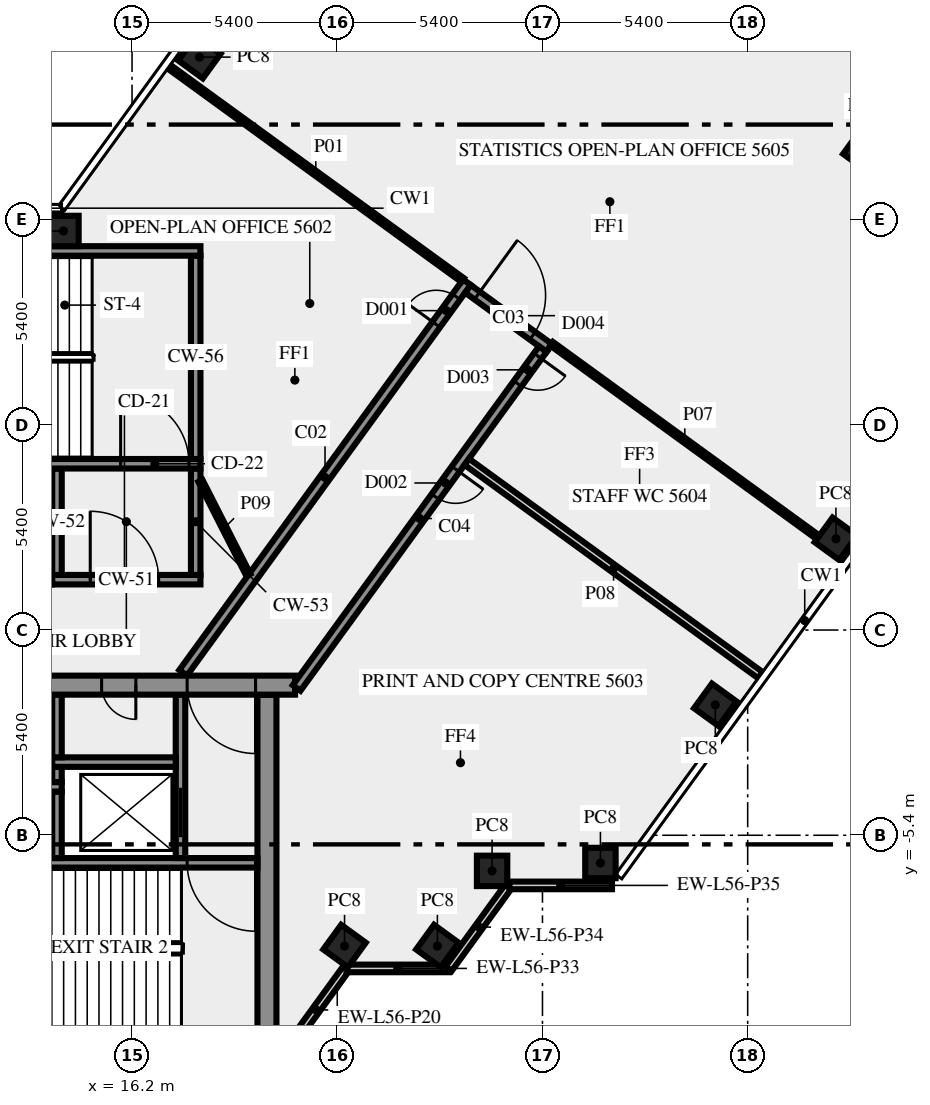
"""IFC4 building model, lengths in metres.
Left out: names, types, materials, properties, quantities, classifications, styles, units other than length and angle.
Written with IfcOpenShell. Run it as: python <this file> out.ifc"""

import sys

from ifc_helpers import new_model, si_unit, direction, frame, frame_2d, origin, origin_2d, place, context, subcontext, project, spatial, rectangle, extrude, element, fill, save


model = new_model("IFC4")
c1 = context("Model", 3, precision=1e-05, world=origin(), true_north=direction((0.0, 1.0)))
c2 = subcontext(c1, "Body", "Model", "MODEL_VIEW")
j1 = project(units=[si_unit("LENGTHUNIT", "METRE"), si_unit("PLANEANGLEUNIT", "RADIAN")], contexts=[c1])
p1 = place(None, origin())
s1 = spatial("IfcSite", under=j1, at=p1, CompositionType="ELEMENT")
p2 = place(p1, origin())
s2 = spatial("IfcBuilding", under=s1, at=p2, CompositionType="ELEMENT")
p3 = place(p2, frame((0.0, 0.0, 238.0)))
s3 = spatial("IfcBuildingStorey", under=s2, at=p3, CompositionType="ELEMENT", Elevation=238.0)
for number, where, z_axis, x_axis in (
    (1, (21.792, -8.315, 0.0), (0.0, 0.0, 1.0), (0.588, 0.809, 0.0)),
    (2, (24.235, -8.315, 0.0), (0.0, 0.0, 1.0), (0.588, 0.809, 0.0)),
    (3, (25.674, -6.337, 0.0), (0.0, 0.0, 1.0), (1.0, 0.0, 0.0)),
    (4, (28.525, -6.13, 0.0), (0.0, 0.0, 1.0), (1.0, 0.0, 0.0)),
    (5, (31.548, -1.969, 0.0), (0.0, 0.0, 1.0), (0.588, 0.809, 0.0)),
    (6, (34.722, 2.4, 0.0), (0.0, 0.0, 1.0), (0.588, 0.809, 0.0)),
    (7, (35.471, 12.616, 0.0), (0.0, 0.0, 1.0), (-0.809, 0.588, 0.0)),
    (8, (17.974, 15.075, 0.0), (0.0, 0.0, 1.0), (-0.588, -0.809, 0.0)),
    (9, (14.395, 10.5, 0.0), (0.0, 0.0, 1.0), (-1.0, 0.0, 0.0)),
):
    element("IfcColumn", number, at=place(p3, frame(where, z_axis=z_axis, x_axis=x_axis)), inside=s3, PredefinedType="COLUMN", context=c2, shape_type="SweptSolid", body=[
        extrude(rectangle(XDim=0.8, YDim=0.8, at=origin_2d()), origin(), (0.0, 0.0, 1.0), 3.4),
    ])
p4 = place(p3, frame((20.253, -11.083, 0.0), z_axis=(0.0, 0.0, 1.0), x_axis=(0.587766567315, 0.809030569476, 0.0)))
e10 = element("IfcWall", 10, at=p4, inside=s3, PredefinedType="SOLIDWALL", context=c2, shape_type="SweptSolid", body=[
    extrude(rectangle(XDim=2.688, YDim=0.2, at=frame_2d((1.344, 0.0))), origin(), (0.0, 0.0, 1.0), 3.4),
])
p5 = place(p3, frame((21.843, -8.904, 0.0), z_axis=(0.0, 0.0, 1.0), x_axis=(1.0, 0.0, 0.0)))
e11 = element("IfcWall", 11, at=p5, inside=s3, PredefinedType="SOLIDWALL", context=c2, shape_type="SweptSolid", body=[
    extrude(rectangle(XDim=2.7, YDim=0.2, at=frame_2d((1.35, 0.0))), origin(), (0.0, 0.0, 1.0), 3.4),
])
p6 = place(p3, frame((24.533, -8.909, 0.0), z_axis=(0.0, 0.0, 1.0), x_axis=(0.587720002413, 0.809064397168, 0.0)))
e12 = element("IfcWall", 12, at=p6, inside=s3, PredefinedType="SOLIDWALL", context=c2, shape_type="SweptSolid", body=[
    extrude(rectangle(XDim=2.7, YDim=0.2, at=frame_2d((1.35, 0.0))), origin(), (0.0, 0.0, 1.0), 3.4),
])
p7 = place(p3, frame((26.13, -6.719, 0.0), z_axis=(0.0, 0.0, 1.0), x_axis=(1.0, 0.0, 0.0)))
e13 = element("IfcWall", 13, at=p7, inside=s3, PredefinedType="SOLIDWALL", context=c2, shape_type="SweptSolid", body=[
    extrude(rectangle(XDim=2.7, YDim=0.2, at=frame_2d((1.35, 0.0))), origin(), (0.0, 0.0, 1.0), 3.4),
])
p8 = place(p3, frame((19.75, -10.5, 0.0), z_axis=(0.0, 0.0, 1.0), x_axis=(0.0, 1.0, 0.0)))
e14 = element("IfcWall", 14, at=p8, inside=s3, PredefinedType="SHEAR", context=c2, shape_type="SweptSolid", body=[
    extrude(rectangle(XDim=8.8, YDim=0.5, at=frame_2d((4.4, 0.0))), origin(), (0.0, 0.0, 1.0), 3.4),
])
p9 = place(p3, frame((19.5, -6.125, 0.0), z_axis=(0.0, 0.0, 1.0), x_axis=(-1.0, 0.0, 0.0)))
e15 = element("IfcWall", 15, at=p9, inside=s3, PredefinedType="SHEAR", context=c2, shape_type="SweptSolid", body=[
    extrude(rectangle(XDim=8.05, YDim=0.25, at=frame_2d((4.025, 0.0))), origin(), (0.0, 0.0, 1.0), 3.4),
])
p10 = place(p9, frame((0.05, 0.0, 0.0)))
e16 = element("IfcOpeningElement", 16, at=p10, cuts=e15, PredefinedType="OPENING", context=c2, shape_type="SweptSolid", body=[
    extrude(rectangle(XDim=1.8, YDim=2.1, at=frame_2d((0.9, 1.05))), frame((0.0, 0.135, 0.0), z_axis=(0.0, -1.0, 0.0), x_axis=(1.0, 0.0, 0.0)), (0.0, 0.0, 1.0), 0.27),
])
p11 = place(p3, frame((14.225, -6.0, 0.0), z_axis=(0.0, 0.0, 1.0), x_axis=(0.0, 1.0, 0.0)))
e17 = element("IfcWall", 17, at=p11, inside=s3, PredefinedType="SHEAR", context=c2, shape_type="SweptSolid", body=[
    extrude(rectangle(XDim=1.75, YDim=0.25, at=frame_2d((0.875, 0.0))), origin(), (0.0, 0.0, 1.0), 3.4),
])
p12 = place(p3, frame((17.475, -6.0, 0.0), z_axis=(0.0, 0.0, 1.0), x_axis=(0.0, 1.0, 0.0)))
e18 = element("IfcWall", 18, at=p12, inside=s3, PredefinedType="SHEAR", context=c2, shape_type="SweptSolid", body=[
    extrude(rectangle(XDim=4.3, YDim=0.25, at=frame_2d((2.15, 0.0))), origin(), (0.0, 0.0, 1.0), 3.4),
])
p13 = place(p12, frame((0.55, 0.0, 0.0)))
e19 = element("IfcOpeningElement", 19, at=p13, cuts=e18, PredefinedType="OPENING", context=c2, shape_type="SweptSolid", body=[
    extrude(rectangle(XDim=1.3, YDim=2.1, at=frame_2d((0.65, 1.05))), frame((0.0, 0.135, 0.0), z_axis=(0.0, -1.0, 0.0), x_axis=(1.0, 0.0, 0.0)), (0.0, 0.0, 1.0), 0.27),
])
p14 = place(p3, frame((1.45, -4.125, 0.0), z_axis=(0.0, 0.0, 1.0), x_axis=(1.0, 0.0, 0.0)))
e20 = element("IfcWall", 20, at=p14, inside=s3, PredefinedType="SHEAR", context=c2, shape_type="SweptSolid", body=[
    extrude(rectangle(XDim=12.9, YDim=0.25, at=frame_2d((6.45, 0.0))), origin(), (0.0, 0.0, 1.0), 3.4),
])
p15 = place(p14, frame((0.7, 0.0, 0.0)))
e21 = element("IfcOpeningElement", 21, at=p15, cuts=e20, PredefinedType="OPENING", context=c2, shape_type="SweptSolid", body=[
    extrude(rectangle(XDim=1.3, YDim=2.1, at=frame_2d((0.65, 1.05))), frame((0.0, 0.135, 0.0), z_axis=(0.0, -1.0, 0.0), x_axis=(1.0, 0.0, 0.0)), (0.0, 0.0, 1.0), 0.27),
])
p16 = place(p14, frame((3.3, 0.0, 0.0)))
e22 = element("IfcOpeningElement", 22, at=p16, cuts=e20, PredefinedType="OPENING", context=c2, shape_type="SweptSolid", body=[
    extrude(rectangle(XDim=1.1, YDim=2.1, at=frame_2d((0.55, 1.05))), frame((0.0, 0.135, 0.0), z_axis=(0.0, -1.0, 0.0), x_axis=(1.0, 0.0, 0.0)), (0.0, 0.0, 1.0), 0.27),
])
p17 = place(p14, frame((5.8, 0.0, 0.0)))
e23 = element("IfcOpeningElement", 23, at=p17, cuts=e20, PredefinedType="OPENING", context=c2, shape_type="SweptSolid", body=[
    extrude(rectangle(XDim=1.1, YDim=2.1, at=frame_2d((0.55, 1.05))), frame((0.0, 0.135, 0.0), z_axis=(0.0, -1.0, 0.0), x_axis=(1.0, 0.0, 0.0)), (0.0, 0.0, 1.0), 0.27),
])
p18 = place(p14, frame((8.3, 0.0, 0.0)))
e24 = element("IfcOpeningElement", 24, at=p18, cuts=e20, PredefinedType="OPENING", context=c2, shape_type="SweptSolid", body=[
    extrude(rectangle(XDim=1.1, YDim=2.1, at=frame_2d((0.55, 1.05))), frame((0.0, 0.135, 0.0), z_axis=(0.0, -1.0, 0.0), x_axis=(1.0, 0.0, 0.0)), (0.0, 0.0, 1.0), 0.27),
])
p19 = place(p3, frame((14.225, -4.0, 0.0), z_axis=(0.0, 0.0, 1.0), x_axis=(0.0, 1.0, 0.0)))
e25 = element("IfcWall", 25, at=p19, inside=s3, PredefinedType="SHEAR", context=c2, shape_type="SweptSolid", body=[
    extrude(rectangle(XDim=0.4, YDim=0.25, at=frame_2d((0.2, 0.0))), origin(), (0.0, 0.0, 1.0), 3.4),
])
p20 = place(p3, frame((14.1, -3.475, 0.0), z_axis=(0.0, 0.0, 1.0), x_axis=(1.0, 0.0, 0.0)))
e26 = element("IfcWall", 26, at=p20, inside=s3, PredefinedType="SHEAR", context=c2, shape_type="SweptSolid", body=[
    extrude(rectangle(XDim=3.25, YDim=0.25, at=frame_2d((1.625, 0.0))), origin(), (0.0, 0.0, 1.0), 3.4),
])
p21 = place(p3, frame((14.225, -3.35, 0.0), z_axis=(0.0, 0.0, 1.0), x_axis=(0.0, 1.0, 0.0)))
e27 = element("IfcWall", 27, at=p21, inside=s3, PredefinedType="SHEAR", context=c2, shape_type="SweptSolid", body=[
    extrude(rectangle(XDim=1.65, YDim=0.25, at=frame_2d((0.825, 0.0))), origin(), (0.0, 0.0, 1.0), 3.4),
])
p22 = place(p3, frame((20.49, -1.45, 0.0), z_axis=(0.0, 0.0, 1.0), x_axis=(-1.0, 0.0, 0.0)))
e28 = element("IfcWall", 28, at=p22, inside=s3, PredefinedType="SHEAR", context=c2, shape_type="SweptSolid", body=[
    extrude(rectangle(XDim=40.98, YDim=0.5, at=frame_2d((20.49, 0.0))), origin(), (0.0, 0.0, 1.0), 3.4),
])
p23 = place(p22, frame((38.14, 0.0, 0.0)))
e29 = element("IfcOpeningElement", 29, at=p23, cuts=e28, PredefinedType="OPENING", context=c2, shape_type="SweptSolid", body=[
    extrude(rectangle(XDim=1.8, YDim=2.1, at=frame_2d((0.9, 1.05))), frame((0.0, 0.26, 0.0), z_axis=(0.0, -1.0, 0.0), x_axis=(1.0, 0.0, 0.0)), (0.0, 0.0, 1.0), 0.52),
])
p24 = place(p22, frame((36.728, 0.0, 0.0)))
e30 = element("IfcOpeningElement", 30, at=p24, cuts=e28, PredefinedType="OPENING", context=c2, shape_type="SweptSolid", body=[
    extrude(rectangle(XDim=0.8, YDim=2.1, at=frame_2d((0.4, 1.05))), frame((0.0, 0.26, 0.0), z_axis=(0.0, -1.0, 0.0), x_axis=(1.0, 0.0, 0.0)), (0.0, 0.0, 1.0), 0.52),
])
p25 = place(p22, frame((35.153, 0.0, 0.0)))
e31 = element("IfcOpeningElement", 31, at=p25, cuts=e28, PredefinedType="OPENING", context=c2, shape_type="SweptSolid", body=[
    extrude(rectangle(XDim=0.8, YDim=2.1, at=frame_2d((0.4, 1.05))), frame((0.0, 0.26, 0.0), z_axis=(0.0, -1.0, 0.0), x_axis=(1.0, 0.0, 0.0)), (0.0, 0.0, 1.0), 0.52),
])
p26 = place(p22, frame((32.94, 0.0, 0.0)))
e32 = element("IfcOpeningElement", 32, at=p26, cuts=e28, PredefinedType="OPENING", context=c2, shape_type="SweptSolid", body=[
    extrude(rectangle(XDim=0.9, YDim=2.1, at=frame_2d((0.45, 1.05))), frame((0.0, 0.26, 0.0), z_axis=(0.0, -1.0, 0.0), x_axis=(1.0, 0.0, 0.0)), (0.0, 0.0, 1.0), 0.52),
])
p27 = place(p22, frame((29.603, 0.0, 0.0)))
e33 = element("IfcOpeningElement", 33, at=p27, cuts=e28, PredefinedType="OPENING", context=c2, shape_type="SweptSolid", body=[
    extrude(rectangle(XDim=0.9, YDim=2.1, at=frame_2d((0.45, 1.05))), frame((0.0, 0.26, 0.0), z_axis=(0.0, -1.0, 0.0), x_axis=(1.0, 0.0, 0.0)), (0.0, 0.0, 1.0), 0.52),
])
p28 = place(p22, frame((25.877, 0.0, 0.0)))
e34 = element("IfcOpeningElement", 34, at=p28, cuts=e28, PredefinedType="OPENING", context=c2, shape_type="SweptSolid", body=[
    extrude(rectangle(XDim=0.9, YDim=2.1, at=frame_2d((0.45, 1.05))), frame((0.0, 0.26, 0.0), z_axis=(0.0, -1.0, 0.0), x_axis=(1.0, 0.0, 0.0)), (0.0, 0.0, 1.0), 0.52),
])
p29 = place(p22, frame((19.59, 0.0, 0.0)))
e35 = element("IfcOpeningElement", 35, at=p29, cuts=e28, PredefinedType="OPENING", context=c2, shape_type="SweptSolid", body=[
    extrude(rectangle(XDim=2.0, YDim=2.1, at=frame_2d((1.0, 1.05))), frame((0.0, 0.26, 0.0), z_axis=(0.0, -1.0, 0.0), x_axis=(1.0, 0.0, 0.0)), (0.0, 0.0, 1.0), 0.52),
])
p30 = place(p22, frame((7.14, 0.0, 0.0)))
e36 = element("IfcOpeningElement", 36, at=p30, cuts=e28, PredefinedType="OPENING", context=c2, shape_type="SweptSolid", body=[
    extrude(rectangle(XDim=0.9, YDim=2.1, at=frame_2d((0.45, 1.05))), frame((0.0, 0.26, 0.0), z_axis=(0.0, -1.0, 0.0), x_axis=(1.0, 0.0, 0.0)), (0.0, 0.0, 1.0), 0.52),
])
p31 = place(p22, frame((4.19, 0.0, 0.0)))
e37 = element("IfcOpeningElement", 37, at=p31, cuts=e28, PredefinedType="OPENING", context=c2, shape_type="SweptSolid", body=[
    extrude(rectangle(XDim=0.9, YDim=2.1, at=frame_2d((0.45, 1.05))), frame((0.0, 0.26, 0.0), z_axis=(0.0, -1.0, 0.0), x_axis=(1.0, 0.0, 0.0)), (0.0, 0.0, 1.0), 0.52),
])
p32 = place(p22, frame((1.04, 0.0, 0.0)))
e38 = element("IfcOpeningElement", 38, at=p32, cuts=e28, PredefinedType="OPENING", context=c2, shape_type="SweptSolid", body=[
    extrude(rectangle(XDim=1.8, YDim=2.1, at=frame_2d((0.9, 1.05))), frame((0.0, 0.26, 0.0), z_axis=(0.0, -1.0, 0.0), x_axis=(1.0, 0.0, 0.0)), (0.0, 0.0, 1.0), 0.52),
])
p33 = place(p3, frame((14.1, 1.325, 0.0), z_axis=(0.0, 0.0, 1.0), x_axis=(1.0, 0.0, 0.0)))
e39 = element("IfcWall", 39, at=p33, inside=s3, PredefinedType="SHEAR", context=c2, shape_type="SweptSolid", body=[
    extrude(rectangle(XDim=3.9, YDim=0.25, at=frame_2d((1.95, 0.0))), origin(), (0.0, 0.0, 1.0), 3.4),
])
p34 = place(p33, frame((1.0, 0.0, 0.0)))
e40 = element("IfcOpeningElement", 40, at=p34, cuts=e39, PredefinedType="OPENING", context=c2, shape_type="SweptSolid", body=[
    extrude(rectangle(XDim=1.8, YDim=2.1, at=frame_2d((0.9, 1.05))), frame((0.0, 0.135, 0.0), z_axis=(0.0, -1.0, 0.0), x_axis=(1.0, 0.0, 0.0)), (0.0, 0.0, 1.0), 0.27),
])
for number, where, z_axis, x_axis in (
    (41, (14.225, 1.45, 0.0), (0.0, 0.0, 1.0), (0.0, 1.0, 0.0)),
    (42, (17.875, 1.45, 0.0), (0.0, 0.0, 1.0), (0.0, 1.0, 0.0)),
):
    element("IfcWall", number, at=place(p3, frame(where, z_axis=z_axis, x_axis=x_axis)), inside=s3, PredefinedType="SHEAR", context=c2, shape_type="SweptSolid", body=[
        extrude(rectangle(XDim=2.8, YDim=0.25, at=frame_2d((1.4, 0.0))), origin(), (0.0, 0.0, 1.0), 3.4),
    ])
p35 = place(p3, frame((7.5, 4.375, 0.0), z_axis=(0.0, 0.0, 1.0), x_axis=(1.0, 0.0, 0.0)))
e43 = element("IfcWall", 43, at=p35, inside=s3, PredefinedType="SHEAR", context=c2, shape_type="SweptSolid", body=[
    extrude(rectangle(XDim=10.5, YDim=0.25, at=frame_2d((5.25, 0.0))), origin(), (0.0, 0.0, 1.0), 3.4),
])
p36 = place(p35, frame((8.4, 0.0, 0.0)))
e44 = element("IfcOpeningElement", 44, at=p36, cuts=e43, PredefinedType="OPENING", context=c2, shape_type="SweptSolid", body=[
    extrude(rectangle(XDim=1.8, YDim=2.1, at=frame_2d((0.9, 1.05))), frame((0.0, 0.135, 0.0), z_axis=(0.0, -1.0, 0.0), x_axis=(1.0, 0.0, 0.0)), (0.0, 0.0, 1.0), 0.27),
])
p37 = place(p3, frame((17.875, 4.5, 0.0), z_axis=(0.0, 0.0, 1.0), x_axis=(0.0, 1.0, 0.0)))
e45 = element("IfcWall", 45, at=p37, inside=s3, PredefinedType="SHEAR", context=c2, shape_type="SweptSolid", body=[
    extrude(rectangle(XDim=5.35, YDim=0.25, at=frame_2d((2.675, 0.0))), origin(), (0.0, 0.0, 1.0), 3.4),
])
p38 = place(p3, frame((7.5, 9.975, 0.0), z_axis=(0.0, 0.0, 1.0), x_axis=(1.0, 0.0, 0.0)))
e46 = element("IfcWall", 46, at=p38, inside=s3, PredefinedType="SHEAR", context=c2, shape_type="SweptSolid", body=[
    extrude(rectangle(XDim=10.5, YDim=0.25, at=frame_2d((5.25, 0.0))), origin(), (0.0, 0.0, 1.0), 3.4),
])
p39 = place(p38, frame((2.0, 0.0, 1.0)))
e47 = element("IfcOpeningElement", 47, at=p39, cuts=e46, PredefinedType="OPENING", context=c2, shape_type="SweptSolid", body=[
    extrude(rectangle(XDim=1.2, YDim=1.2, at=frame_2d((0.6, 0.6))), frame((0.0, 0.135, 0.0), z_axis=(0.0, -1.0, 0.0), x_axis=(1.0, 0.0, 0.0)), (0.0, 0.0, 1.0), 0.27),
])
p40 = place(p3, frame((17.545, -1.125, 0.0), z_axis=(0.0, 0.0, 1.0), x_axis=(0.587796810203, 0.809008596935, 0.0)))
e48 = element("IfcWall", 48, at=p40, inside=s3, PredefinedType="SOLIDWALL", context=c2, shape_type="SweptSolid", body=[
    extrude(rectangle(XDim=12.703, YDim=0.25, at=frame_2d((6.352, 0.0))), origin(), (0.0, 0.0, 1.0), 3.4),
])
p41 = place(p40, frame((11.329, 0.0, 0.0)))
e49 = element("IfcOpeningElement", 49, at=p41, cuts=e48, PredefinedType="OPENING", context=c2, shape_type="SweptSolid", body=[
    extrude(rectangle(XDim=0.9, YDim=2.1, at=frame_2d((0.45, 1.05))), frame((0.0, 0.135, 0.0), z_axis=(0.0, -1.0, 0.0), x_axis=(1.0, 0.0, 0.0)), (0.0, 0.0, 1.0), 0.27),
])
p42 = place(p3, frame((25.039, 8.978, 0.0), z_axis=(0.0, 0.0, 1.0), x_axis=(0.809006914995, -0.587799125119, 0.0)))
e50 = element("IfcWall", 50, at=p42, inside=s3, PredefinedType="SOLIDWALL", context=c2, shape_type="SweptSolid", body=[
    extrude(rectangle(XDim=2.65, YDim=0.25, at=frame_2d((1.325, 0.0))), origin(), (0.0, 0.0, 1.0), 3.4),
])
p43 = place(p42, frame((0.301, 0.0, 0.0)))
e51 = element("IfcOpeningElement", 51, at=p43, cuts=e50, PredefinedType="OPENING", context=c2, shape_type="SweptSolid", body=[
    extrude(rectangle(XDim=1.8, YDim=2.1, at=frame_2d((0.9, 1.05))), frame((0.0, 0.135, 0.0), z_axis=(0.0, -1.0, 0.0), x_axis=(1.0, 0.0, 0.0)), (0.0, 0.0, 1.0), 0.27),
])
p44 = place(p3, frame((27.009, 7.392, 0.0), z_axis=(0.0, 0.0, 1.0), x_axis=(-0.587776457057, -0.809023384414, 0.0)))
e52 = element("IfcWall", 52, at=p44, inside=s3, PredefinedType="SOLIDWALL", context=c2, shape_type="SweptSolid", body=[
    extrude(rectangle(XDim=11.021, YDim=0.25, at=frame_2d((5.51, 0.0))), origin(), (0.0, 0.0, 1.0), 3.4),
])
p45 = place(p44, frame((3.905, 0.0, 0.0)))
e53 = element("IfcOpeningElement", 53, at=p45, cuts=e52, PredefinedType="OPENING", context=c2, shape_type="SweptSolid", body=[
    extrude(rectangle(XDim=0.9, YDim=2.1, at=frame_2d((0.45, 1.05))), frame((0.0, 0.135, 0.0), z_axis=(0.0, -1.0, 0.0), x_axis=(1.0, 0.0, 0.0)), (0.0, 0.0, 1.0), 0.27),
])
p46 = place(p44, frame((0.225, 0.0, 0.0)))
e54 = element("IfcOpeningElement", 54, at=p46, cuts=e52, PredefinedType="OPENING", context=c2, shape_type="SweptSolid", body=[
    extrude(rectangle(XDim=0.9, YDim=2.1, at=frame_2d((0.45, 1.05))), frame((0.0, 0.135, 0.0), z_axis=(0.0, -1.0, 0.0), x_axis=(1.0, 0.0, 0.0)), (0.0, 0.0, 1.0), 0.27),
])
p47 = place(p3, frame((24.898, 9.209, 0.0), z_axis=(0.0, 0.0, 1.0), x_axis=(-0.809013490065, 0.587790075531, 0.0)))
e55 = element("IfcWall", 55, at=p47, inside=s3, PredefinedType="PARTITIONING", context=c2, shape_type="SweptSolid", body=[
    extrude(rectangle(XDim=9.549, YDim=0.12, at=frame_2d((4.775, 0.0))), origin(), (0.0, 0.0, 1.0), 2.6),
])
p48 = place(p3, frame((27.24, 7.532, 0.0), z_axis=(0.0, 0.0, 1.0), x_axis=(0.809033281668, -0.587762834103, 0.0)))
e56 = element("IfcWall", 56, at=p48, inside=s3, PredefinedType="PARTITIONING", context=c2, shape_type="SweptSolid", body=[
    extrude(rectangle(XDim=8.665, YDim=0.12, at=frame_2d((4.333, 0.0))), origin(), (0.0, 0.0, 1.0), 3.4),
])
p49 = place(p3, frame((32.734, -1.187, 0.0), z_axis=(0.0, 0.0, 1.0), x_axis=(-0.808994684961, 0.587815957341, 0.0)))
e57 = element("IfcWall", 57, at=p49, inside=s3, PredefinedType="SOLIDWALL", context=c2, shape_type="SweptSolid", body=[
    extrude(rectangle(XDim=9.55, YDim=0.2, at=frame_2d((4.775, 0.0))), origin(), (0.0, 0.0, 1.0), 2.6),
])
p50 = place(p3, frame((18.0, 3.925, 0.0), z_axis=(0.0, 0.0, 1.0), x_axis=(0.453950796792, -0.891026752736, 0.0)))
e58 = element("IfcWall", 58, at=p50, inside=s3, PredefinedType="PARTITIONING", context=c2, shape_type="SweptSolid", body=[
    extrude(rectangle(XDim=2.778, YDim=0.12, at=frame_2d((1.389, 0.0))), origin(), (0.0, 0.0, 1.0), 3.4),
])
p51 = place(p10, origin())
e59 = element("IfcDoor", 59, at=p51, inside=s3, OperationType="DOUBLE_DOOR_SINGLE_SWING", PredefinedType="DOOR", context=c2, shape_type="SweptSolid", body=[
    extrude(rectangle(XDim=1.8, YDim=2.1, at=frame_2d((0.9, 1.05))), frame((0.0, 0.025, 0.0), z_axis=(0.0, -1.0, 0.0), x_axis=(1.0, 0.0, 0.0)), (0.0, 0.0, 1.0), 0.05),
])
fill(e16, e59)
p52 = place(p13, origin())
e60 = element("IfcDoor", 60, at=p52, inside=s3, OperationType="DOUBLE_DOOR_SLIDING", PredefinedType="DOOR", context=c2, shape_type="SweptSolid", body=[
    extrude(rectangle(XDim=1.3, YDim=2.1, at=frame_2d((0.65, 1.05))), frame((0.0, 0.025, 0.0), z_axis=(0.0, -1.0, 0.0), x_axis=(1.0, 0.0, 0.0)), (0.0, 0.0, 1.0), 0.05),
])
fill(e19, e60)
p53 = place(p31, origin())
e61 = element("IfcDoor", 61, at=p53, inside=s3, OperationType="SINGLE_SWING_LEFT", PredefinedType="DOOR", context=c2, shape_type="SweptSolid", body=[
    extrude(rectangle(XDim=0.9, YDim=2.1, at=frame_2d((0.45, 1.05))), frame((0.0, 0.025, 0.0), z_axis=(0.0, -1.0, 0.0), x_axis=(1.0, 0.0, 0.0)), (0.0, 0.0, 1.0), 0.05),
])
fill(e37, e61)
p54 = place(p32, origin())
e62 = element("IfcDoor", 62, at=p54, inside=s3, OperationType="DOUBLE_DOOR_SINGLE_SWING", PredefinedType="DOOR", context=c2, shape_type="SweptSolid", body=[
    extrude(rectangle(XDim=1.8, YDim=2.1, at=frame_2d((0.9, 1.05))), frame((0.0, 0.025, 0.0), z_axis=(0.0, -1.0, 0.0), x_axis=(1.0, 0.0, 0.0)), (0.0, 0.0, 1.0), 0.05),
])
fill(e38, e62)
p55 = place(p34, origin())
e63 = element("IfcDoor", 63, at=p55, inside=s3, OperationType="DOUBLE_DOOR_SINGLE_SWING", PredefinedType="DOOR", context=c2, shape_type="SweptSolid", body=[
    extrude(rectangle(XDim=1.8, YDim=2.1, at=frame_2d((0.9, 1.05))), frame((0.0, 0.025, 0.0), z_axis=(0.0, -1.0, 0.0), x_axis=(1.0, 0.0, 0.0)), (0.0, 0.0, 1.0), 0.05),
])
fill(e40, e63)
p56 = place(p36, origin())
e64 = element("IfcDoor", 64, at=p56, inside=s3, OperationType="DOUBLE_DOOR_SINGLE_SWING", PredefinedType="DOOR", context=c2, shape_type="SweptSolid", body=[
    extrude(rectangle(XDim=1.8, YDim=2.1, at=frame_2d((0.9, 1.05))), frame((0.0, 0.025, 0.0), z_axis=(0.0, -1.0, 0.0), x_axis=(1.0, 0.0, 0.0)), (0.0, 0.0, 1.0), 0.05),
])
fill(e44, e64)
p57 = place(p41, origin())
e65 = element("IfcDoor", 65, at=p57, inside=s3, OperationType="SINGLE_SWING_RIGHT", PredefinedType="DOOR", context=c2, shape_type="SweptSolid", body=[
    extrude(rectangle(XDim=0.9, YDim=2.1, at=frame_2d((0.45, 1.05))), frame((0.0, 0.025, 0.0), z_axis=(0.0, -1.0, 0.0), x_axis=(1.0, 0.0, 0.0)), (0.0, 0.0, 1.0), 0.05),
])
fill(e49, e65)
p58 = place(p43, origin())
e66 = element("IfcDoor", 66, at=p58, inside=s3, OperationType="DOUBLE_DOOR_SINGLE_SWING", PredefinedType="DOOR", context=c2, shape_type="SweptSolid", body=[
    extrude(rectangle(XDim=1.8, YDim=2.1, at=frame_2d((0.9, 1.05))), frame((0.0, 0.025, 0.0), z_axis=(0.0, -1.0, 0.0), x_axis=(1.0, 0.0, 0.0)), (0.0, 0.0, 1.0), 0.05),
])
fill(e51, e66)
p59 = place(p45, origin())
e67 = element("IfcDoor", 67, at=p59, inside=s3, OperationType="SINGLE_SWING_LEFT", PredefinedType="DOOR", context=c2, shape_type="SweptSolid", body=[
    extrude(rectangle(XDim=0.9, YDim=2.1, at=frame_2d((0.45, 1.05))), frame((0.0, 0.025, 0.0), z_axis=(0.0, -1.0, 0.0), x_axis=(1.0, 0.0, 0.0)), (0.0, 0.0, 1.0), 0.05),
])
fill(e53, e67)
p60 = place(p46, origin())
e68 = element("IfcDoor", 68, at=p60, inside=s3, OperationType="SINGLE_SWING_LEFT", PredefinedType="DOOR", context=c2, shape_type="SweptSolid", body=[
    extrude(rectangle(XDim=0.9, YDim=2.1, at=frame_2d((0.45, 1.05))), frame((0.0, 0.025, 0.0), z_axis=(0.0, -1.0, 0.0), x_axis=(1.0, 0.0, 0.0)), (0.0, 0.0, 1.0), 0.05),
])
fill(e54, e68)
save(model, sys.argv[1])
